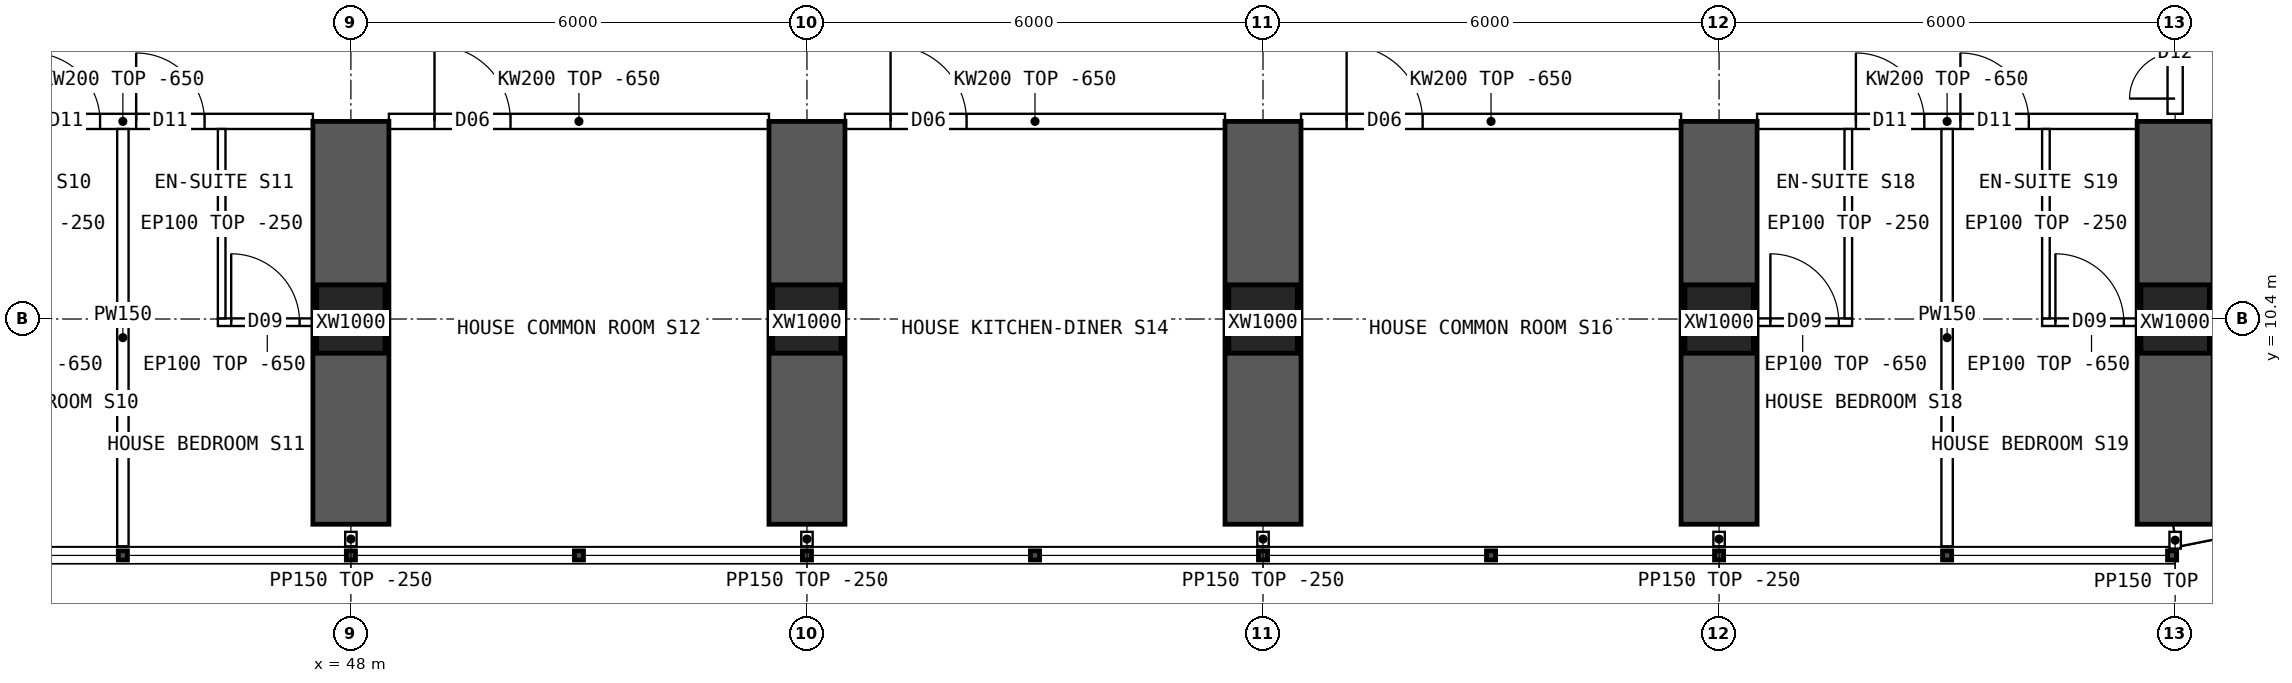
"""IFC4 building model, lengths in metres.
Left out: names, types, materials, properties, quantities, classifications, styles, units other than length and angle.
Written with IfcOpenShell. Run it as: python <this file> out.ifc"""

import sys

from ifc_helpers import new_model, si_unit, direction, frame, frame_2d, origin, origin_2d, place, context, subcontext, project, spatial, polyline, rectangle, hollow_rectangle, outline, extrude, element, fill, save


model = new_model("IFC4")
c1 = context("Model", 3, precision=1e-05, world=origin(), true_north=direction((0.0, 1.0)))
c2 = subcontext(c1, "Body", "Model", "MODEL_VIEW")
j1 = project(units=[si_unit("LENGTHUNIT", "METRE"), si_unit("PLANEANGLEUNIT", "RADIAN")], contexts=[c1])
p1 = place(None, origin())
s1 = spatial("IfcSite", under=j1, at=p1, CompositionType="ELEMENT")
p2 = place(p1, origin())
s2 = spatial("IfcBuilding", under=s1, at=p2, CompositionType="ELEMENT")
p3 = place(p2, frame((0.0, 0.0, 61.45)))
s3 = spatial("IfcBuildingStorey", under=s2, at=p3, CompositionType="ELEMENT", Elevation=61.45)
for number, where, z_axis, x_axis in (
    (1, (48.0, 10.4, 0.0), (0.0, 0.0, 1.0), (1.0, 0.0, 0.0)),
    (2, (54.0, 10.4, 0.0), (0.0, 0.0, 1.0), (1.0, 0.0, 0.0)),
    (3, (60.0, 10.4, 0.0), (0.0, 0.0, 1.0), (1.0, 0.0, 0.0)),
    (4, (66.0, 10.4, 0.0), (0.0, 0.0, 1.0), (1.0, 0.0, 0.0)),
    (5, (72.0, 10.4, 0.0), (0.0, 0.0, 1.0), (1.0, 0.0, 0.0)),
):
    element("IfcColumn", number, at=place(p3, frame(where, z_axis=z_axis, x_axis=x_axis)), inside=s3, PredefinedType="COLUMN", context=c2, shape_type="SweptSolid", body=[
        extrude(hollow_rectangle(XDim=0.9, YDim=0.9, WallThickness=0.09, at=origin_2d()), origin(), (0.0, 0.0, 1.0), 3.75),
    ])
for number, where, z_axis, x_axis in (
    (6, (48.0, 7.7, 0.0), (0.0, 0.0, 1.0), (0.0, 1.0, 0.0)),
    (7, (54.0, 7.7, 0.0), (0.0, 0.0, 1.0), (0.0, 1.0, 0.0)),
    (8, (60.0, 7.7, 0.0), (0.0, 0.0, 1.0), (0.0, 1.0, 0.0)),
    (9, (66.0, 7.7, 0.0), (0.0, 0.0, 1.0), (0.0, 1.0, 0.0)),
    (10, (72.0, 7.7, 0.0), (0.0, 0.0, 1.0), (0.0, 1.0, 0.0)),
):
    element("IfcWall", number, at=place(p3, frame(where, z_axis=z_axis, x_axis=x_axis)), inside=s3, PredefinedType="SHEAR", context=c2, shape_type="SweptSolid", body=[
        extrude(rectangle(XDim=5.3, YDim=1.0, at=frame_2d((2.65, 0.0))), origin(), (0.0, 0.0, 1.0), 3.75),
    ])
p4 = place(p3, frame((72.0, 7.55, 0.0), z_axis=(0.0, 0.0, 1.0), x_axis=(0.980787251524, 0.195080412259, 0.0)))
e11 = element("IfcWall", 11, at=p4, inside=s3, PredefinedType="SOLIDWALL", context=c2, shape_type="SweptSolid", body=[
    extrude(outline(polyline([(-0.03, -0.15), (3.249, -0.15), (3.189, 0.15), (0.03, 0.15), (-0.03, -0.15)])), origin(), (0.0, 0.0, 1.0), 3.5),
])
p5 = place(p4, frame((0.909, 0.0, 0.9)))
e12 = element("IfcOpeningElement", 12, at=p5, cuts=e11, PredefinedType="OPENING", context=c2, shape_type="SweptSolid", body=[
    extrude(rectangle(XDim=1.4, YDim=1.8, at=frame_2d((0.7, 0.9))), frame((0.0, 0.16, 0.0), z_axis=(0.0, -1.0, 0.0), x_axis=(1.0, 0.0, 0.0)), (0.0, 0.0, 1.0), 0.32),
])
p6 = place(p3, frame((42.5, 13.0, 0.0), z_axis=(0.0, 0.0, 1.0), x_axis=(1.0, 0.0, 0.0)))
e13 = element("IfcWall", 13, at=p6, inside=s3, PredefinedType="SOLIDWALL", context=c2, shape_type="SweptSolid", body=[
    extrude(outline(polyline([(0.0, 0.0), (5.0, 0.0), (5.0, 3.1), (0.0, 3.1), (0.0, 0.0)])), frame((0.0, 0.1, 0.0), z_axis=(0.0, -1.0, 0.0), x_axis=(1.0, 0.0, 0.0)), (0.0, 0.0, 1.0), 0.2),
])
p7 = place(p6, frame((1.3, 0.0, 0.0)))
e14 = element("IfcOpeningElement", 14, at=p7, cuts=e13, PredefinedType="OPENING", context=c2, shape_type="SweptSolid", body=[
    extrude(rectangle(XDim=0.9, YDim=2.1, at=frame_2d((0.45, 1.05))), frame((0.0, 0.11, 0.0), z_axis=(0.0, -1.0, 0.0), x_axis=(1.0, 0.0, 0.0)), (0.0, 0.0, 1.0), 0.22),
])
p8 = place(p6, frame((2.675, 0.0, 0.0)))
e15 = element("IfcOpeningElement", 15, at=p8, cuts=e13, PredefinedType="OPENING", context=c2, shape_type="SweptSolid", body=[
    extrude(rectangle(XDim=0.9, YDim=2.1, at=frame_2d((0.45, 1.05))), frame((0.0, 0.11, 0.0), z_axis=(0.0, -1.0, 0.0), x_axis=(1.0, 0.0, 0.0)), (0.0, 0.0, 1.0), 0.22),
])
p9 = place(p3, frame((48.5, 13.0, 0.0), z_axis=(0.0, 0.0, 1.0), x_axis=(1.0, 0.0, 0.0)))
e16 = element("IfcWall", 16, at=p9, inside=s3, PredefinedType="SOLIDWALL", context=c2, shape_type="SweptSolid", body=[
    extrude(outline(polyline([(0.0, 0.0), (5.0, 0.0), (5.0, 3.1), (0.0, 3.1), (0.0, 0.0)])), frame((0.0, 0.1, 0.0), z_axis=(0.0, -1.0, 0.0), x_axis=(1.0, 0.0, 0.0)), (0.0, 0.0, 1.0), 0.2),
])
p10 = place(p9, frame((0.6, 0.0, 0.0)))
e17 = element("IfcOpeningElement", 17, at=p10, cuts=e16, PredefinedType="OPENING", context=c2, shape_type="SweptSolid", body=[
    extrude(rectangle(XDim=1.0, YDim=2.1, at=frame_2d((0.5, 1.05))), frame((0.0, 0.11, 0.0), z_axis=(0.0, -1.0, 0.0), x_axis=(1.0, 0.0, 0.0)), (0.0, 0.0, 1.0), 0.22),
])
p11 = place(p3, frame((54.5, 13.0, 0.0), z_axis=(0.0, 0.0, 1.0), x_axis=(1.0, 0.0, 0.0)))
e18 = element("IfcWall", 18, at=p11, inside=s3, PredefinedType="SOLIDWALL", context=c2, shape_type="SweptSolid", body=[
    extrude(outline(polyline([(0.0, 0.0), (5.0, 0.0), (5.0, 3.1), (0.0, 3.1), (0.0, 0.0)])), frame((0.0, 0.1, 0.0), z_axis=(0.0, -1.0, 0.0), x_axis=(1.0, 0.0, 0.0)), (0.0, 0.0, 1.0), 0.2),
])
p12 = place(p11, frame((0.6, 0.0, 0.0)))
e19 = element("IfcOpeningElement", 19, at=p12, cuts=e18, PredefinedType="OPENING", context=c2, shape_type="SweptSolid", body=[
    extrude(rectangle(XDim=1.0, YDim=2.1, at=frame_2d((0.5, 1.05))), frame((0.0, 0.11, 0.0), z_axis=(0.0, -1.0, 0.0), x_axis=(1.0, 0.0, 0.0)), (0.0, 0.0, 1.0), 0.22),
])
p13 = place(p3, frame((60.5, 13.0, 0.0), z_axis=(0.0, 0.0, 1.0), x_axis=(1.0, 0.0, 0.0)))
e20 = element("IfcWall", 20, at=p13, inside=s3, PredefinedType="SOLIDWALL", context=c2, shape_type="SweptSolid", body=[
    extrude(outline(polyline([(0.0, 0.0), (5.0, 0.0), (5.0, 3.1), (0.0, 3.1), (0.0, 0.0)])), frame((0.0, 0.1, 0.0), z_axis=(0.0, -1.0, 0.0), x_axis=(1.0, 0.0, 0.0)), (0.0, 0.0, 1.0), 0.2),
])
p14 = place(p13, frame((0.6, 0.0, 0.0)))
e21 = element("IfcOpeningElement", 21, at=p14, cuts=e20, PredefinedType="OPENING", context=c2, shape_type="SweptSolid", body=[
    extrude(rectangle(XDim=1.0, YDim=2.1, at=frame_2d((0.5, 1.05))), frame((0.0, 0.11, 0.0), z_axis=(0.0, -1.0, 0.0), x_axis=(1.0, 0.0, 0.0)), (0.0, 0.0, 1.0), 0.22),
])
p15 = place(p3, frame((66.5, 13.0, 0.0), z_axis=(0.0, 0.0, 1.0), x_axis=(1.0, 0.0, 0.0)))
e22 = element("IfcWall", 22, at=p15, inside=s3, PredefinedType="SOLIDWALL", context=c2, shape_type="SweptSolid", body=[
    extrude(outline(polyline([(0.0, 0.0), (5.0, 0.0), (5.0, 3.1), (0.0, 3.1), (0.0, 0.0)])), frame((0.0, 0.1, 0.0), z_axis=(0.0, -1.0, 0.0), x_axis=(1.0, 0.0, 0.0)), (0.0, 0.0, 1.0), 0.2),
])
p16 = place(p15, frame((1.3, 0.0, 0.0)))
e23 = element("IfcOpeningElement", 23, at=p16, cuts=e22, PredefinedType="OPENING", context=c2, shape_type="SweptSolid", body=[
    extrude(rectangle(XDim=0.9, YDim=2.1, at=frame_2d((0.45, 1.05))), frame((0.0, 0.11, 0.0), z_axis=(0.0, -1.0, 0.0), x_axis=(1.0, 0.0, 0.0)), (0.0, 0.0, 1.0), 0.22),
])
p17 = place(p15, frame((2.675, 0.0, 0.0)))
e24 = element("IfcOpeningElement", 24, at=p17, cuts=e22, PredefinedType="OPENING", context=c2, shape_type="SweptSolid", body=[
    extrude(rectangle(XDim=0.9, YDim=2.1, at=frame_2d((0.45, 1.05))), frame((0.0, 0.11, 0.0), z_axis=(0.0, -1.0, 0.0), x_axis=(1.0, 0.0, 0.0)), (0.0, 0.0, 1.0), 0.22),
])
p18 = place(p3, frame((45.0, 7.41, 0.0), z_axis=(0.0, 0.0, 1.0), x_axis=(0.0, 1.0, 0.0)))
e25 = element("IfcWall", 25, at=p18, inside=s3, PredefinedType="PARTITIONING", context=c2, shape_type="SweptSolid", body=[
    extrude(outline(polyline([(0.0, 0.0), (5.49, 0.0), (5.49, 3.1), (5.442, 3.1), (5.44, 3.5), (3.192, 3.5), (3.19, 3.1), (2.792, 3.1), (2.79, 3.5), (0.0, 3.5), (0.0, 0.0)])), frame((0.0, 0.075, 0.0), z_axis=(0.0, -1.0, 0.0), x_axis=(1.0, 0.0, 0.0)), (0.0, 0.0, 1.0), 0.15),
])
p19 = place(p3, frame((47.55, 10.358, 0.0), z_axis=(0.0, 0.0, 1.0), x_axis=(-1.0, 0.0, 0.0)))
e26 = element("IfcWall", 26, at=p19, inside=s3, PredefinedType="PARTITIONING", context=c2, shape_type="SweptSolid", body=[
    extrude(outline(polyline([(0.0, 0.0), (1.3, 0.0), (1.3, 3.1), (0.0, 3.1), (0.0, 0.0)])), frame((0.0, 0.05, 0.0), z_axis=(0.0, -1.0, 0.0), x_axis=(1.0, 0.0, 0.0)), (0.0, 0.0, 1.0), 0.1),
])
p20 = place(p19, frame((0.225, 0.0, 0.0)))
e27 = element("IfcOpeningElement", 27, at=p20, cuts=e26, PredefinedType="OPENING", context=c2, shape_type="SweptSolid", body=[
    extrude(rectangle(XDim=0.9, YDim=2.1, at=frame_2d((0.45, 1.05))), frame((0.0, 0.06, 0.0), z_axis=(0.0, -1.0, 0.0), x_axis=(1.0, 0.0, 0.0)), (0.0, 0.0, 1.0), 0.12),
])
p21 = place(p3, frame((46.3, 10.408, 0.0), z_axis=(0.0, 0.0, 1.0), x_axis=(0.0, 1.0, 0.0)))
e28 = element("IfcWall", 28, at=p21, inside=s3, PredefinedType="PARTITIONING", context=c2, shape_type="SweptSolid", body=[
    extrude(outline(polyline([(0.0, 0.0), (2.492, 0.0), (2.492, 3.1), (2.444, 3.1), (2.442, 3.5), (0.194, 3.5), (0.192, 3.1), (0.0, 3.1), (0.0, 0.0)])), frame((0.0, 0.05, 0.0), z_axis=(0.0, -1.0, 0.0), x_axis=(1.0, 0.0, 0.0)), (0.0, 0.0, 1.0), 0.1),
])
p22 = place(p3, frame((69.0, 7.41, 0.0), z_axis=(0.0, 0.0, 1.0), x_axis=(0.0, 1.0, 0.0)))
e29 = element("IfcWall", 29, at=p22, inside=s3, PredefinedType="PARTITIONING", context=c2, shape_type="SweptSolid", body=[
    extrude(outline(polyline([(0.0, 0.0), (5.49, 0.0), (5.49, 3.1), (5.442, 3.1), (5.44, 3.5), (3.192, 3.5), (3.19, 3.1), (2.792, 3.1), (2.79, 3.5), (0.0, 3.5), (0.0, 0.0)])), frame((0.0, 0.075, 0.0), z_axis=(0.0, -1.0, 0.0), x_axis=(1.0, 0.0, 0.0)), (0.0, 0.0, 1.0), 0.15),
])
p23 = place(p3, frame((67.75, 10.358, 0.0), z_axis=(0.0, 0.0, 1.0), x_axis=(-1.0, 0.0, 0.0)))
e30 = element("IfcWall", 30, at=p23, inside=s3, PredefinedType="PARTITIONING", context=c2, shape_type="SweptSolid", body=[
    extrude(outline(polyline([(0.0, 0.0), (1.3, 0.0), (1.3, 3.1), (0.0, 3.1), (0.0, 0.0)])), frame((0.0, 0.05, 0.0), z_axis=(0.0, -1.0, 0.0), x_axis=(1.0, 0.0, 0.0)), (0.0, 0.0, 1.0), 0.1),
])
p24 = place(p23, frame((0.175, 0.0, 0.0)))
e31 = element("IfcOpeningElement", 31, at=p24, cuts=e30, PredefinedType="OPENING", context=c2, shape_type="SweptSolid", body=[
    extrude(rectangle(XDim=0.9, YDim=2.1, at=frame_2d((0.45, 1.05))), frame((0.0, 0.06, 0.0), z_axis=(0.0, -1.0, 0.0), x_axis=(1.0, 0.0, 0.0)), (0.0, 0.0, 1.0), 0.12),
])
p25 = place(p3, frame((67.7, 10.408, 0.0), z_axis=(0.0, 0.0, 1.0), x_axis=(0.0, 1.0, 0.0)))
e32 = element("IfcWall", 32, at=p25, inside=s3, PredefinedType="PARTITIONING", context=c2, shape_type="SweptSolid", body=[
    extrude(outline(polyline([(0.0, 0.0), (2.492, 0.0), (2.492, 3.1), (2.444, 3.1), (2.442, 3.5), (0.194, 3.5), (0.192, 3.1), (0.0, 3.1), (0.0, 0.0)])), frame((0.0, 0.05, 0.0), z_axis=(0.0, -1.0, 0.0), x_axis=(1.0, 0.0, 0.0)), (0.0, 0.0, 1.0), 0.1),
])
p26 = place(p3, frame((71.55, 10.358, 0.0), z_axis=(0.0, 0.0, 1.0), x_axis=(-1.0, 0.0, 0.0)))
e33 = element("IfcWall", 33, at=p26, inside=s3, PredefinedType="PARTITIONING", context=c2, shape_type="SweptSolid", body=[
    extrude(outline(polyline([(0.0, 0.0), (1.3, 0.0), (1.3, 3.1), (0.0, 3.1), (0.0, 0.0)])), frame((0.0, 0.05, 0.0), z_axis=(0.0, -1.0, 0.0), x_axis=(1.0, 0.0, 0.0)), (0.0, 0.0, 1.0), 0.1),
])
p27 = place(p26, frame((0.225, 0.0, 0.0)))
e34 = element("IfcOpeningElement", 34, at=p27, cuts=e33, PredefinedType="OPENING", context=c2, shape_type="SweptSolid", body=[
    extrude(rectangle(XDim=0.9, YDim=2.1, at=frame_2d((0.45, 1.05))), frame((0.0, 0.06, 0.0), z_axis=(0.0, -1.0, 0.0), x_axis=(1.0, 0.0, 0.0)), (0.0, 0.0, 1.0), 0.12),
])
p28 = place(p3, frame((70.3, 10.408, 0.0), z_axis=(0.0, 0.0, 1.0), x_axis=(0.0, 1.0, 0.0)))
e35 = element("IfcWall", 35, at=p28, inside=s3, PredefinedType="PARTITIONING", context=c2, shape_type="SweptSolid", body=[
    extrude(outline(polyline([(0.0, 0.0), (2.492, 0.0), (2.492, 3.1), (2.444, 3.1), (2.442, 3.5), (0.194, 3.5), (0.192, 3.1), (0.0, 3.1), (0.0, 0.0)])), frame((0.0, 0.05, 0.0), z_axis=(0.0, -1.0, 0.0), x_axis=(1.0, 0.0, 0.0)), (0.0, 0.0, 1.0), 0.1),
])
p29 = place(p3, frame((72.0, 13.1, 0.0), z_axis=(0.0, 0.0, 1.0), x_axis=(0.0, 1.0, 0.0)))
e36 = element("IfcWall", 36, at=p29, inside=s3, PredefinedType="SOLIDWALL", context=c2, shape_type="SweptSolid", body=[
    extrude(outline(polyline([(0.0, 0.0), (1.6, 0.0), (1.6, 3.05), (0.0, 3.05), (0.0, 0.0)])), frame((0.0, 0.1, 0.0), z_axis=(0.0, -1.0, 0.0), x_axis=(1.0, 0.0, 0.0)), (0.0, 0.0, 1.0), 0.2),
])
p30 = place(p29, frame((0.2, 0.0, 0.0)))
e37 = element("IfcOpeningElement", 37, at=p30, cuts=e36, PredefinedType="OPENING", context=c2, shape_type="SweptSolid", body=[
    extrude(rectangle(XDim=1.2, YDim=2.1, at=frame_2d((0.6, 1.05))), frame((0.0, 0.11, 0.0), z_axis=(0.0, -1.0, 0.0), x_axis=(1.0, 0.0, 0.0)), (0.0, 0.0, 1.0), 0.22),
])
for number, where, z_axis, x_axis in (
    (38, (48.0, 7.6, 0.0), (0.0, 0.0, 1.0), (0.0, -1.0, 0.0)),
    (39, (54.0, 7.6, 0.0), (0.0, 0.0, 1.0), (0.0, -1.0, 0.0)),
    (40, (60.0, 7.6, 0.0), (0.0, 0.0, 1.0), (0.0, -1.0, 0.0)),
    (41, (66.0, 7.6, 0.0), (0.0, 0.0, 1.0), (0.0, -1.0, 0.0)),
):
    element("IfcWall", number, at=place(p3, frame(where, z_axis=z_axis, x_axis=x_axis)), inside=s3, PredefinedType="PARTITIONING", context=c2, shape_type="SweptSolid", body=[
        extrude(rectangle(XDim=0.19, YDim=0.15, at=frame_2d((0.095, 0.0))), origin(), (0.0, 0.0, 1.0), 3.5),
    ])
p31 = place(p3, frame((72.0, 7.6, 0.0), z_axis=(0.0, 0.0, 1.0), x_axis=(0.0, -1.0, 0.0)))
e42 = element("IfcWall", 42, at=p31, inside=s3, PredefinedType="PARTITIONING", context=c2, shape_type="SweptSolid", body=[
    extrude(rectangle(XDim=0.22, YDim=0.15, at=frame_2d((0.11, 0.0))), origin(), (0.0, 0.0, 1.0), 3.5),
])
p32 = place(p7, origin())
e43 = element("IfcDoor", 43, at=p32, inside=s3, OperationType="SINGLE_SWING_LEFT", PredefinedType="DOOR", context=c2, shape_type="SweptSolid", body=[
    extrude(rectangle(XDim=0.9, YDim=2.1, at=frame_2d((0.45, 1.05))), frame((0.0, 0.025, 0.0), z_axis=(0.0, -1.0, 0.0), x_axis=(1.0, 0.0, 0.0)), (0.0, 0.0, 1.0), 0.05),
])
fill(e14, e43)
p33 = place(p20, origin())
e44 = element("IfcDoor", 44, at=p33, inside=s3, OperationType="SINGLE_SWING_RIGHT", PredefinedType="DOOR", context=c2, shape_type="SweptSolid", body=[
    extrude(rectangle(XDim=0.9, YDim=2.1, at=frame_2d((0.45, 1.05))), frame((0.0, 0.025, 0.0), z_axis=(0.0, -1.0, 0.0), x_axis=(1.0, 0.0, 0.0)), (0.0, 0.0, 1.0), 0.05),
])
fill(e27, e44)
p34 = place(p8, origin())
e45 = element("IfcDoor", 45, at=p34, inside=s3, OperationType="SINGLE_SWING_LEFT", PredefinedType="DOOR", context=c2, shape_type="SweptSolid", body=[
    extrude(rectangle(XDim=0.9, YDim=2.1, at=frame_2d((0.45, 1.05))), frame((0.0, 0.025, 0.0), z_axis=(0.0, -1.0, 0.0), x_axis=(1.0, 0.0, 0.0)), (0.0, 0.0, 1.0), 0.05),
])
fill(e15, e45)
p35 = place(p10, origin())
e46 = element("IfcDoor", 46, at=p35, inside=s3, OperationType="SINGLE_SWING_LEFT", PredefinedType="DOOR", context=c2, shape_type="SweptSolid", body=[
    extrude(rectangle(XDim=1.0, YDim=2.1, at=frame_2d((0.5, 1.05))), frame((0.0, 0.025, 0.0), z_axis=(0.0, -1.0, 0.0), x_axis=(1.0, 0.0, 0.0)), (0.0, 0.0, 1.0), 0.05),
])
fill(e17, e46)
p36 = place(p12, origin())
e47 = element("IfcDoor", 47, at=p36, inside=s3, OperationType="SINGLE_SWING_LEFT", PredefinedType="DOOR", context=c2, shape_type="SweptSolid", body=[
    extrude(rectangle(XDim=1.0, YDim=2.1, at=frame_2d((0.5, 1.05))), frame((0.0, 0.025, 0.0), z_axis=(0.0, -1.0, 0.0), x_axis=(1.0, 0.0, 0.0)), (0.0, 0.0, 1.0), 0.05),
])
fill(e19, e47)
p37 = place(p14, origin())
e48 = element("IfcDoor", 48, at=p37, inside=s3, OperationType="SINGLE_SWING_LEFT", PredefinedType="DOOR", context=c2, shape_type="SweptSolid", body=[
    extrude(rectangle(XDim=1.0, YDim=2.1, at=frame_2d((0.5, 1.05))), frame((0.0, 0.025, 0.0), z_axis=(0.0, -1.0, 0.0), x_axis=(1.0, 0.0, 0.0)), (0.0, 0.0, 1.0), 0.05),
])
fill(e21, e48)
p38 = place(p24, origin())
e49 = element("IfcDoor", 49, at=p38, inside=s3, OperationType="SINGLE_SWING_RIGHT", PredefinedType="DOOR", context=c2, shape_type="SweptSolid", body=[
    extrude(rectangle(XDim=0.9, YDim=2.1, at=frame_2d((0.45, 1.05))), frame((0.0, 0.025, 0.0), z_axis=(0.0, -1.0, 0.0), x_axis=(1.0, 0.0, 0.0)), (0.0, 0.0, 1.0), 0.05),
])
fill(e31, e49)
p39 = place(p16, origin())
e50 = element("IfcDoor", 50, at=p39, inside=s3, OperationType="SINGLE_SWING_LEFT", PredefinedType="DOOR", context=c2, shape_type="SweptSolid", body=[
    extrude(rectangle(XDim=0.9, YDim=2.1, at=frame_2d((0.45, 1.05))), frame((0.0, 0.025, 0.0), z_axis=(0.0, -1.0, 0.0), x_axis=(1.0, 0.0, 0.0)), (0.0, 0.0, 1.0), 0.05),
])
fill(e23, e50)
p40 = place(p27, origin())
e51 = element("IfcDoor", 51, at=p40, inside=s3, OperationType="SINGLE_SWING_RIGHT", PredefinedType="DOOR", context=c2, shape_type="SweptSolid", body=[
    extrude(rectangle(XDim=0.9, YDim=2.1, at=frame_2d((0.45, 1.05))), frame((0.0, 0.025, 0.0), z_axis=(0.0, -1.0, 0.0), x_axis=(1.0, 0.0, 0.0)), (0.0, 0.0, 1.0), 0.05),
])
fill(e34, e51)
p41 = place(p17, origin())
e52 = element("IfcDoor", 52, at=p41, inside=s3, OperationType="SINGLE_SWING_LEFT", PredefinedType="DOOR", context=c2, shape_type="SweptSolid", body=[
    extrude(rectangle(XDim=0.9, YDim=2.1, at=frame_2d((0.45, 1.05))), frame((0.0, 0.025, 0.0), z_axis=(0.0, -1.0, 0.0), x_axis=(1.0, 0.0, 0.0)), (0.0, 0.0, 1.0), 0.05),
])
fill(e24, e52)
p42 = place(p30, origin())
e53 = element("IfcDoor", 53, at=p42, inside=s3, OperationType="DOUBLE_DOOR_SINGLE_SWING", PredefinedType="DOOR", context=c2, shape_type="SweptSolid", body=[
    extrude(rectangle(XDim=1.2, YDim=2.1, at=frame_2d((0.6, 1.05))), frame((0.0, 0.025, 0.0), z_axis=(0.0, -1.0, 0.0), x_axis=(1.0, 0.0, 0.0)), (0.0, 0.0, 1.0), 0.05),
])
fill(e37, e53)
save(model, sys.argv[1])
